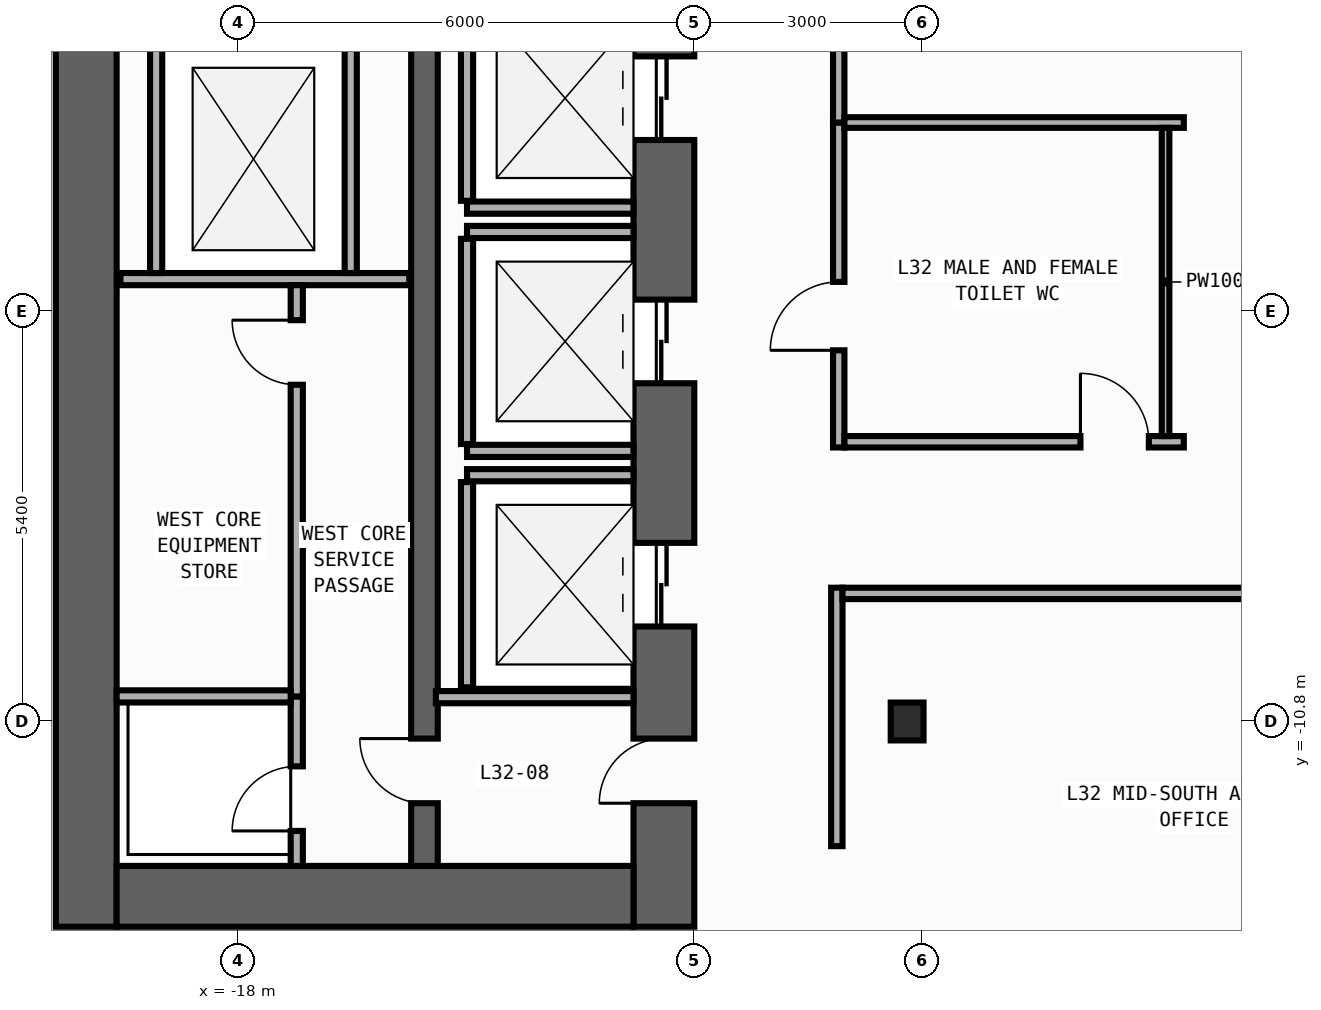
"""IFC4 building model, lengths in metres.
Left out: names, types, materials, properties, quantities, classifications, styles, units other than length and angle.
Written with IfcOpenShell. Run it as: python <this file> out.ifc"""

import sys

from ifc_helpers import new_model, si_unit, direction, frame, frame_2d, origin, origin_2d, place, context, subcontext, project, spatial, rectangle, i_section, extrude, element, fill, save


model = new_model("IFC4")
c1 = context("Model", 3, precision=1e-05, world=origin(), true_north=direction((0.0, 1.0)))
c2 = subcontext(c1, "Body", "Model", "MODEL_VIEW")
j1 = project(units=[si_unit("LENGTHUNIT", "METRE"), si_unit("PLANEANGLEUNIT", "RADIAN")], contexts=[c1])
p1 = place(None, origin())
s1 = spatial("IfcSite", under=j1, at=p1, CompositionType="ELEMENT")
p2 = place(p1, origin())
s2 = spatial("IfcBuilding", under=s1, at=p2, CompositionType="ELEMENT")
p3 = place(p2, frame((0.0, 0.0, 139.4)))
s3 = spatial("IfcBuildingStorey", under=s2, at=p3, CompositionType="ELEMENT", Elevation=139.4)
p4 = place(p3, frame((-20.0, -13.5, 0.0), z_axis=(0.0, 0.0, 1.0), x_axis=(0.0, 1.0, 0.0)))
e1 = element("IfcWall", 1, at=p4, inside=s3, PredefinedType="SHEAR", context=c2, shape_type="SweptSolid", body=[
    extrude(rectangle(XDim=27.0, YDim=0.8, at=frame_2d((13.5, 0.0))), origin(), (0.0, 0.0, 1.0), 3.94),
])
p5 = place(p3, frame((-12.4, -13.5, 0.0), z_axis=(0.0, 0.0, 1.0), x_axis=(0.0, 1.0, 0.0)))
e2 = element("IfcWall", 2, at=p5, inside=s3, PredefinedType="SHEAR", context=c2, shape_type="SweptSolid", body=[
    extrude(rectangle(XDim=27.0, YDim=0.8, at=frame_2d((13.5, 0.0))), origin(), (0.0, 0.0, 1.0), 3.94),
])
p6 = place(p5, frame((10.35, 0.0, 0.0)))
e3 = element("IfcOpeningElement", 3, at=p6, cuts=e2, PredefinedType="OPENING", context=c2, shape_type="SweptSolid", body=[
    extrude(rectangle(XDim=1.1, YDim=2.2, at=frame_2d((0.55, 1.1))), frame((0.0, 0.41, 0.0), z_axis=(0.0, -1.0, 0.0), x_axis=(1.0, 0.0, 0.0)), (0.0, 0.0, 1.0), 0.82),
])
p7 = place(p5, frame((7.15, 0.0, 0.0)))
e4 = element("IfcOpeningElement", 4, at=p7, cuts=e2, PredefinedType="OPENING", context=c2, shape_type="SweptSolid", body=[
    extrude(rectangle(XDim=1.1, YDim=2.2, at=frame_2d((0.55, 1.1))), frame((0.0, 0.41, 0.0), z_axis=(0.0, -1.0, 0.0), x_axis=(1.0, 0.0, 0.0)), (0.0, 0.0, 1.0), 0.82),
])
p8 = place(p5, frame((3.95, 0.0, 0.0)))
e5 = element("IfcOpeningElement", 5, at=p8, cuts=e2, PredefinedType="OPENING", context=c2, shape_type="SweptSolid", body=[
    extrude(rectangle(XDim=1.1, YDim=2.2, at=frame_2d((0.55, 1.1))), frame((0.0, 0.41, 0.0), z_axis=(0.0, -1.0, 0.0), x_axis=(1.0, 0.0, 0.0)), (0.0, 0.0, 1.0), 0.82),
])
p9 = place(p5, frame((15.175, 0.0, 0.0)))
e6 = element("IfcOpeningElement", 6, at=p9, cuts=e2, PredefinedType="OPENING", context=c2, shape_type="SweptSolid", body=[
    extrude(rectangle(XDim=0.85, YDim=2.1, at=frame_2d((0.425, 1.05))), frame((0.0, 0.41, 0.0), z_axis=(0.0, -1.0, 0.0), x_axis=(1.0, 0.0, 0.0)), (0.0, 0.0, 1.0), 0.82),
])
p10 = place(p5, frame((21.275, 0.0, 0.0)))
e7 = element("IfcOpeningElement", 7, at=p10, cuts=e2, PredefinedType="OPENING", context=c2, shape_type="SweptSolid", body=[
    extrude(rectangle(XDim=0.85, YDim=2.1, at=frame_2d((0.425, 1.05))), frame((0.0, 0.41, 0.0), z_axis=(0.0, -1.0, 0.0), x_axis=(1.0, 0.0, 0.0)), (0.0, 0.0, 1.0), 0.82),
])
p11 = place(p5, frame((12.725, 0.0, 0.0)))
e8 = element("IfcOpeningElement", 8, at=p11, cuts=e2, PredefinedType="OPENING", context=c2, shape_type="SweptSolid", body=[
    extrude(rectangle(XDim=1.15, YDim=2.2, at=frame_2d((0.575, 1.1))), frame((0.0, 0.41, 0.0), z_axis=(0.0, -1.0, 0.0), x_axis=(1.0, 0.0, 0.0)), (0.0, 0.0, 1.0), 0.82),
])
p12 = place(p5, frame((1.625, 0.0, 0.0)))
e9 = element("IfcOpeningElement", 9, at=p12, cuts=e2, PredefinedType="OPENING", context=c2, shape_type="SweptSolid", body=[
    extrude(rectangle(XDim=0.85, YDim=2.1, at=frame_2d((0.425, 1.05))), frame((0.0, 0.41, 0.0), z_axis=(0.0, -1.0, 0.0), x_axis=(1.0, 0.0, 0.0)), (0.0, 0.0, 1.0), 0.82),
])
p13 = place(p3, frame((-19.6, -13.1, 0.0), z_axis=(0.0, 0.0, 1.0), x_axis=(1.0, 0.0, 0.0)))
e10 = element("IfcWall", 10, at=p13, inside=s3, PredefinedType="SHEAR", context=c2, shape_type="SweptSolid", body=[
    extrude(rectangle(XDim=6.8, YDim=0.8, at=frame_2d((3.4, 0.0))), origin(), (0.0, 0.0, 1.0), 3.94),
])
p14 = place(p3, frame((-15.55, -12.7, 0.0), z_axis=(0.0, 0.0, 1.0), x_axis=(0.0, 1.0, 0.0)))
e11 = element("IfcWall", 11, at=p14, inside=s3, PredefinedType="SHEAR", context=c2, shape_type="SweptSolid", body=[
    extrude(rectangle(XDim=25.4, YDim=0.35, at=frame_2d((12.7, 0.0))), origin(), (0.0, 0.0, 1.0), 3.94),
])
p15 = place(p14, frame((11.925, 0.0, 0.0)))
e12 = element("IfcOpeningElement", 12, at=p15, cuts=e11, PredefinedType="OPENING", context=c2, shape_type="SweptSolid", body=[
    extrude(rectangle(XDim=1.15, YDim=2.2, at=frame_2d((0.575, 1.1))), frame((0.0, 0.185, 0.0), z_axis=(0.0, -1.0, 0.0), x_axis=(1.0, 0.0, 0.0)), (0.0, 0.0, 1.0), 0.37),
])
p16 = place(p14, frame((0.825, 0.0, 0.0)))
e13 = element("IfcOpeningElement", 13, at=p16, cuts=e11, PredefinedType="OPENING", context=c2, shape_type="SweptSolid", body=[
    extrude(rectangle(XDim=0.85, YDim=2.1, at=frame_2d((0.425, 1.05))), frame((0.0, 0.185, 0.0), z_axis=(0.0, -1.0, 0.0), x_axis=(1.0, 0.0, 0.0)), (0.0, 0.0, 1.0), 0.37),
])
p17 = place(p3, frame((-9.2, -10.8, 0.0), z_axis=(0.0, 0.0, 1.0), x_axis=(1.0, 0.0, 0.0)))
e14 = element("IfcColumn", 14, at=p17, inside=s3, PredefinedType="COLUMN", context=c2, shape_type="SweptSolid", body=[
    extrude(i_section(OverallWidth=0.432, OverallDepth=0.498, WebThickness=0.045, FlangeThickness=0.07, FilletRadius=0.022, at=origin_2d()), origin(), (0.0, 0.0, 1.0), 4.2),
])
p18 = place(p3, frame((-14.99, -4.04, 0.0), z_axis=(0.0, 0.0, 1.0), x_axis=(1.0, 0.0, 0.0)))
e15 = element("IfcWall", 15, at=p18, inside=s3, PredefinedType="STANDARD", context=c2, shape_type="SweptSolid", body=[
    extrude(rectangle(XDim=2.19, YDim=0.16, at=frame_2d((1.095, 0.0))), origin(), (0.0, 0.0, 1.0), 3.94),
])
p19 = place(p3, frame((-14.99, -3.95, 0.0), z_axis=(0.0, 0.0, 1.0), x_axis=(0.0, 1.0, 0.0)))
e16 = element("IfcWall", 16, at=p19, inside=s3, PredefinedType="STANDARD", context=c2, shape_type="SweptSolid", body=[
    extrude(rectangle(XDim=2.7, YDim=0.16, at=frame_2d((1.35, 0.0))), origin(), (0.0, 0.0, 1.0), 3.94),
])
for number, where, z_axis, x_axis in (
    (17, (-14.99, -7.24, 0.0), (0.0, 0.0, 1.0), (1.0, 0.0, 0.0)),
    (18, (-14.99, -4.36, 0.0), (0.0, 0.0, 1.0), (1.0, 0.0, 0.0)),
):
    element("IfcWall", number, at=place(p3, frame(where, z_axis=z_axis, x_axis=x_axis)), inside=s3, PredefinedType="STANDARD", context=c2, shape_type="SweptSolid", body=[
        extrude(rectangle(XDim=2.19, YDim=0.16, at=frame_2d((1.095, 0.0))), origin(), (0.0, 0.0, 1.0), 3.94),
    ])
p20 = place(p3, frame((-14.99, -7.15, 0.0), z_axis=(0.0, 0.0, 1.0), x_axis=(0.0, 1.0, 0.0)))
e19 = element("IfcWall", 19, at=p20, inside=s3, PredefinedType="STANDARD", context=c2, shape_type="SweptSolid", body=[
    extrude(rectangle(XDim=2.7, YDim=0.16, at=frame_2d((1.35, 0.0))), origin(), (0.0, 0.0, 1.0), 3.94),
])
p21 = place(p3, frame((-14.99, -7.56, 0.0), z_axis=(0.0, 0.0, 1.0), x_axis=(1.0, 0.0, 0.0)))
e20 = element("IfcWall", 20, at=p21, inside=s3, PredefinedType="STANDARD", context=c2, shape_type="SweptSolid", body=[
    extrude(rectangle(XDim=2.19, YDim=0.16, at=frame_2d((1.095, 0.0))), origin(), (0.0, 0.0, 1.0), 3.94),
])
p22 = place(p3, frame((-14.99, -10.35, 0.0), z_axis=(0.0, 0.0, 1.0), x_axis=(0.0, 1.0, 0.0)))
e21 = element("IfcWall", 21, at=p22, inside=s3, PredefinedType="STANDARD", context=c2, shape_type="SweptSolid", body=[
    extrude(rectangle(XDim=2.7, YDim=0.16, at=frame_2d((1.35, 0.0))), origin(), (0.0, 0.0, 1.0), 3.94),
])
p23 = place(p3, frame((-19.55, -4.98, 0.0), z_axis=(0.0, 0.0, 1.0), x_axis=(1.0, 0.0, 0.0)))
e22 = element("IfcWall", 22, at=p23, inside=s3, PredefinedType="STANDARD", context=c2, shape_type="SweptSolid", body=[
    extrude(rectangle(XDim=3.8, YDim=0.16, at=frame_2d((1.9, 0.0))), origin(), (0.0, 0.0, 1.0), 3.94),
])
for number, where, z_axis, x_axis in (
    (23, (-19.08, -4.9, 0.0), (0.0, 0.0, 1.0), (0.0, 1.0, 0.0)),
    (24, (-16.52, -4.9, 0.0), (0.0, 0.0, 1.0), (0.0, 1.0, 0.0)),
):
    element("IfcWall", number, at=place(p3, frame(where, z_axis=z_axis, x_axis=x_axis)), inside=s3, PredefinedType="STANDARD", context=c2, shape_type="SweptSolid", body=[
        extrude(rectangle(XDim=2.96, YDim=0.16, at=frame_2d((1.48, 0.0))), origin(), (0.0, 0.0, 1.0), 3.94),
    ])
p24 = place(p3, frame((-15.4, -10.48, 0.0), z_axis=(0.0, 0.0, 1.0), x_axis=(1.0, 0.0, 0.0)))
e25 = element("IfcWall", 25, at=p24, inside=s3, PredefinedType="STANDARD", context=c2, shape_type="SweptSolid", body=[
    extrude(rectangle(XDim=2.6, YDim=0.16, at=frame_2d((1.3, 0.0))), origin(), (0.0, 0.0, 1.0), 3.94),
])
p25 = place(p3, frame((-17.23, -12.7, 0.0), z_axis=(0.0, 0.0, 1.0), x_axis=(0.0, 1.0, 0.0)))
e26 = element("IfcWall", 26, at=p25, inside=s3, PredefinedType="PARTITIONING", context=c2, shape_type="SweptSolid", body=[
    extrude(rectangle(XDim=2.23, YDim=0.16, at=frame_2d((1.115, 0.0))), origin(), (0.0, 0.0, 1.0), 3.94),
])
p26 = place(p25, frame((0.46, 0.0, 0.0)))
e27 = element("IfcOpeningElement", 27, at=p26, cuts=e26, PredefinedType="OPENING", context=c2, shape_type="SweptSolid", body=[
    extrude(rectangle(XDim=0.85, YDim=2.1, at=frame_2d((0.425, 1.05))), frame((0.0, 0.09, 0.0), z_axis=(0.0, -1.0, 0.0), x_axis=(1.0, 0.0, 0.0)), (0.0, 0.0, 1.0), 0.18),
])
p27 = place(p3, frame((-17.23, -10.47, 0.0), z_axis=(0.0, 0.0, 1.0), x_axis=(0.0, 1.0, 0.0)))
e28 = element("IfcWall", 28, at=p27, inside=s3, PredefinedType="PARTITIONING", context=c2, shape_type="SweptSolid", body=[
    extrude(rectangle(XDim=5.41, YDim=0.16, at=frame_2d((2.705, 0.0))), origin(), (0.0, 0.0, 1.0), 3.94),
])
p28 = place(p27, frame((4.1, 0.0, 0.0)))
e29 = element("IfcOpeningElement", 29, at=p28, cuts=e28, PredefinedType="OPENING", context=c2, shape_type="SweptSolid", body=[
    extrude(rectangle(XDim=0.85, YDim=2.1, at=frame_2d((0.425, 1.05))), frame((0.0, 0.09, 0.0), z_axis=(0.0, -1.0, 0.0), x_axis=(1.0, 0.0, 0.0)), (0.0, 0.0, 1.0), 0.18),
])
p29 = place(p3, frame((-19.6, -10.47, 0.0), z_axis=(0.0, 0.0, 1.0), x_axis=(1.0, 0.0, 0.0)))
e30 = element("IfcWall", 30, at=p29, inside=s3, PredefinedType="PARTITIONING", context=c2, shape_type="SweptSolid", body=[
    extrude(rectangle(XDim=2.29, YDim=0.16, at=frame_2d((1.145, 0.0))), origin(), (0.0, 0.0, 1.0), 3.94),
])
p30 = place(p3, frame((-10.1, -7.195, 0.0), z_axis=(0.0, 0.0, 1.0), x_axis=(0.0, 1.0, 0.0)))
e31 = element("IfcWall", 31, at=p30, inside=s3, PredefinedType="PARTITIONING", context=c2, shape_type="SweptSolid", body=[
    extrude(rectangle(XDim=4.275, YDim=0.15, at=frame_2d((2.138, 0.0))), origin(), (0.0, 0.0, 1.0), 3.94),
])
p31 = place(p30, frame((1.278, 0.0, 0.0)))
e32 = element("IfcOpeningElement", 32, at=p31, cuts=e31, PredefinedType="OPENING", context=c2, shape_type="SweptSolid", body=[
    extrude(rectangle(XDim=0.9, YDim=2.15, at=frame_2d((0.45, 1.075))), frame((0.0, 0.085, 0.0), z_axis=(0.0, -1.0, 0.0), x_axis=(1.0, 0.0, 0.0)), (0.0, 0.0, 1.0), 0.17),
])
p32 = place(p3, frame((-10.1, -2.92, 0.0), z_axis=(0.0, 0.0, 1.0), x_axis=(0.0, 1.0, 0.0)))
e33 = element("IfcWall", 33, at=p32, inside=s3, PredefinedType="PARTITIONING", context=c2, shape_type="SweptSolid", body=[
    extrude(rectangle(XDim=8.915, YDim=0.15, at=frame_2d((4.458, 0.0))), origin(), (0.0, 0.0, 1.0), 3.94),
])
p33 = place(p32, frame((7.555, 0.0, 0.0)))
e34 = element("IfcOpeningElement", 34, at=p33, cuts=e33, PredefinedType="OPENING", context=c2, shape_type="SweptSolid", body=[
    extrude(rectangle(XDim=0.9, YDim=2.15, at=frame_2d((0.45, 1.075))), frame((0.0, 0.085, 0.0), z_axis=(0.0, -1.0, 0.0), x_axis=(1.0, 0.0, 0.0)), (0.0, 0.0, 1.0), 0.17),
])
p34 = place(p3, frame((-10.125, -12.44, 0.0), z_axis=(0.0, 0.0, 1.0), x_axis=(0.0, 1.0, 0.0)))
e35 = element("IfcWall", 35, at=p34, inside=s3, PredefinedType="PARTITIONING", context=c2, shape_type="SweptSolid", body=[
    extrude(rectangle(XDim=3.4, YDim=0.15, at=frame_2d((1.7, 0.0))), origin(), (0.0, 0.0, 1.0), 3.94),
])
p35 = place(p3, frame((-10.025, -7.12, 0.0), z_axis=(0.0, 0.0, 1.0), x_axis=(1.0, 0.0, 0.0)))
e36 = element("IfcWall", 36, at=p35, inside=s3, PredefinedType="PARTITIONING", context=c2, shape_type="SweptSolid", body=[
    extrude(rectangle(XDim=4.465, YDim=0.15, at=frame_2d((2.232, 0.0))), origin(), (0.0, 0.0, 1.0), 3.94),
])
p36 = place(p35, frame((3.105, 0.0, 0.0)))
e37 = element("IfcOpeningElement", 37, at=p36, cuts=e36, PredefinedType="OPENING", context=c2, shape_type="SweptSolid", body=[
    extrude(rectangle(XDim=0.9, YDim=2.15, at=frame_2d((0.45, 1.075))), frame((0.0, 0.085, 0.0), z_axis=(0.0, -1.0, 0.0), x_axis=(1.0, 0.0, 0.0)), (0.0, 0.0, 1.0), 0.17),
])
p37 = place(p3, frame((-10.05, -9.115, 0.0), z_axis=(0.0, 0.0, 1.0), x_axis=(1.0, 0.0, 0.0)))
e38 = element("IfcWall", 38, at=p37, inside=s3, PredefinedType="PARTITIONING", context=c2, shape_type="SweptSolid", body=[
    extrude(rectangle(XDim=8.265, YDim=0.15, at=frame_2d((4.133, 0.0))), origin(), (0.0, 0.0, 1.0), 3.94),
])
p38 = place(p37, frame((6.905, 0.0, 0.0)))
e39 = element("IfcOpeningElement", 39, at=p38, cuts=e38, PredefinedType="OPENING", context=c2, shape_type="SweptSolid", body=[
    extrude(rectangle(XDim=0.9, YDim=2.15, at=frame_2d((0.45, 1.075))), frame((0.0, 0.085, 0.0), z_axis=(0.0, -1.0, 0.0), x_axis=(1.0, 0.0, 0.0)), (0.0, 0.0, 1.0), 0.17),
])
p39 = place(p3, frame((-10.025, -2.92, 0.0), z_axis=(0.0, 0.0, 1.0), x_axis=(1.0, 0.0, 0.0)))
e40 = element("IfcWall", 40, at=p39, inside=s3, PredefinedType="PARTITIONING", context=c2, shape_type="SweptSolid", body=[
    extrude(rectangle(XDim=4.465, YDim=0.14, at=frame_2d((2.232, 0.0))), origin(), (0.0, 0.0, 1.0), 3.94),
])
p40 = place(p3, frame((-5.8, -2.99, 0.0), z_axis=(0.0, 0.0, 1.0), x_axis=(0.0, -1.0, 0.0)))
e41 = element("IfcWall", 41, at=p40, inside=s3, PredefinedType="PARTITIONING", context=c2, shape_type="SweptSolid", body=[
    extrude(rectangle(XDim=4.055, YDim=0.1, at=frame_2d((2.027, 0.0))), origin(), (0.0, 0.0, 1.0), 3.94),
])
p41 = place(p6, origin())
e42 = element("IfcDoor", 42, at=p41, inside=s3, OperationType="DOUBLE_DOOR_SLIDING", PredefinedType="DOOR", context=c2, shape_type="SweptSolid", body=[
    extrude(rectangle(XDim=1.1, YDim=2.2, at=frame_2d((0.55, 1.1))), frame((0.0, 0.025, 0.0), z_axis=(0.0, -1.0, 0.0), x_axis=(1.0, 0.0, 0.0)), (0.0, 0.0, 1.0), 0.05),
])
fill(e3, e42)
p42 = place(p7, origin())
e43 = element("IfcDoor", 43, at=p42, inside=s3, OperationType="DOUBLE_DOOR_SLIDING", PredefinedType="DOOR", context=c2, shape_type="SweptSolid", body=[
    extrude(rectangle(XDim=1.1, YDim=2.2, at=frame_2d((0.55, 1.1))), frame((0.0, 0.025, 0.0), z_axis=(0.0, -1.0, 0.0), x_axis=(1.0, 0.0, 0.0)), (0.0, 0.0, 1.0), 0.05),
])
fill(e4, e43)
p43 = place(p8, origin())
e44 = element("IfcDoor", 44, at=p43, inside=s3, OperationType="DOUBLE_DOOR_SLIDING", PredefinedType="DOOR", context=c2, shape_type="SweptSolid", body=[
    extrude(rectangle(XDim=1.1, YDim=2.2, at=frame_2d((0.55, 1.1))), frame((0.0, 0.025, 0.0), z_axis=(0.0, -1.0, 0.0), x_axis=(1.0, 0.0, 0.0)), (0.0, 0.0, 1.0), 0.05),
])
fill(e5, e44)
p44 = place(p12, origin())
e45 = element("IfcDoor", 45, at=p44, inside=s3, OperationType="SINGLE_SWING_LEFT", PredefinedType="DOOR", context=c2, shape_type="SweptSolid", body=[
    extrude(rectangle(XDim=0.85, YDim=2.1, at=frame_2d((0.425, 1.05))), frame((0.0, 0.025, 0.0), z_axis=(0.0, -1.0, 0.0), x_axis=(1.0, 0.0, 0.0)), (0.0, 0.0, 1.0), 0.05),
])
fill(e9, e45)
p45 = place(p16, origin())
e46 = element("IfcDoor", 46, at=p45, inside=s3, OperationType="SINGLE_SWING_RIGHT", PredefinedType="DOOR", context=c2, shape_type="SweptSolid", body=[
    extrude(rectangle(XDim=0.85, YDim=2.1, at=frame_2d((0.425, 1.05))), frame((0.0, 0.025, 0.0), z_axis=(0.0, -1.0, 0.0), x_axis=(1.0, 0.0, 0.0)), (0.0, 0.0, 1.0), 0.05),
])
fill(e13, e46)
p46 = place(p26, origin())
e47 = element("IfcDoor", 47, at=p46, inside=s3, OperationType="SINGLE_SWING_LEFT", PredefinedType="DOOR", context=c2, shape_type="SweptSolid", body=[
    extrude(rectangle(XDim=0.85, YDim=2.1, at=frame_2d((0.425, 1.05))), frame((0.0, 0.025, 0.0), z_axis=(0.0, -1.0, 0.0), x_axis=(1.0, 0.0, 0.0)), (0.0, 0.0, 1.0), 0.05),
])
fill(e27, e47)
p47 = place(p28, origin())
e48 = element("IfcDoor", 48, at=p47, inside=s3, OperationType="SINGLE_SWING_RIGHT", PredefinedType="DOOR", context=c2, shape_type="SweptSolid", body=[
    extrude(rectangle(XDim=0.85, YDim=2.1, at=frame_2d((0.425, 1.05))), frame((0.0, 0.025, 0.0), z_axis=(0.0, -1.0, 0.0), x_axis=(1.0, 0.0, 0.0)), (0.0, 0.0, 1.0), 0.05),
])
fill(e29, e48)
p48 = place(p31, origin())
e49 = element("IfcDoor", 49, at=p48, inside=s3, OperationType="SINGLE_SWING_LEFT", PredefinedType="DOOR", context=c2, shape_type="SweptSolid", body=[
    extrude(rectangle(XDim=0.9, YDim=2.15, at=frame_2d((0.45, 1.075))), frame((0.0, 0.025, 0.0), z_axis=(0.0, -1.0, 0.0), x_axis=(1.0, 0.0, 0.0)), (0.0, 0.0, 1.0), 0.05),
])
fill(e32, e49)
p49 = place(p36, origin())
e50 = element("IfcDoor", 50, at=p49, inside=s3, OperationType="SINGLE_SWING_LEFT", PredefinedType="DOOR", context=c2, shape_type="SweptSolid", body=[
    extrude(rectangle(XDim=0.9, YDim=2.15, at=frame_2d((0.45, 1.075))), frame((0.0, 0.025, 0.0), z_axis=(0.0, -1.0, 0.0), x_axis=(1.0, 0.0, 0.0)), (0.0, 0.0, 1.0), 0.05),
])
fill(e37, e50)
save(model, sys.argv[1])
